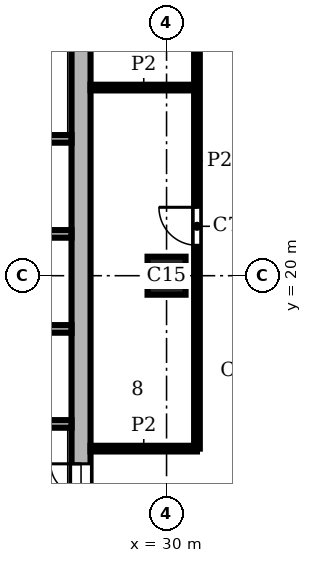
"""IFC4 building model, lengths in metres.
Left out: names, types, materials, properties, quantities, classifications, styles, units other than length and angle.
Written with IfcOpenShell. Run it as: python <this file> out.ifc"""

import sys

from ifc_helpers import new_model, si_unit, direction, frame, frame_2d, origin, origin_2d, place, context, subcontext, project, spatial, rectangle, extrude, element, fill, save


model = new_model("IFC4")
c1 = context("Model", 3, precision=1e-05, world=origin(), true_north=direction((0.0, 1.0)))
c2 = subcontext(c1, "Body", "Model", "MODEL_VIEW")
j1 = project(units=[si_unit("LENGTHUNIT", "METRE"), si_unit("PLANEANGLEUNIT", "RADIAN")], contexts=[c1])
p1 = place(None, origin())
s1 = spatial("IfcSite", under=j1, at=p1, CompositionType="ELEMENT")
p2 = place(p1, origin())
s2 = spatial("IfcBuilding", under=s1, at=p2, CompositionType="ELEMENT")
p3 = place(p2, frame((0.0, 0.0, 309.9)))
s3 = spatial("IfcBuildingStorey", under=s2, at=p3, CompositionType="ELEMENT", Elevation=309.9)
p4 = place(p3, frame((30.0, 20.0, 0.0), z_axis=(0.0, 0.0, 1.0), x_axis=(1.0, 0.0, 0.0)))
e1 = element("IfcColumn", 1, at=p4, inside=s3, PredefinedType="COLUMN", context=c2, shape_type="SweptSolid", body=[
    extrude(rectangle(XDim=1.0, YDim=1.0, at=origin_2d()), origin(), (0.0, 0.0, 1.0), 3.9),
])
p5 = place(p3, frame((27.75, 8.5, 0.0), z_axis=(0.0, 0.0, 1.0), x_axis=(0.0, 1.0, 0.0)))
e2 = element("IfcWall", 2, at=p5, inside=s3, PredefinedType="SHEAR", context=c2, shape_type="SweptSolid", body=[
    extrude(rectangle(XDim=19.0, YDim=0.5, at=frame_2d((9.5, 0.0))), origin(), (0.0, 0.0, 1.0), 3.9),
])
p6 = place(p5, frame((4.95, 0.0, 0.0)))
e3 = element("IfcOpeningElement", 3, at=p6, cuts=e2, PredefinedType="OPENING", context=c2, shape_type="SweptSolid", body=[
    extrude(rectangle(XDim=1.6, YDim=2.1, at=frame_2d((0.8, 1.05))), frame((0.0, 0.26, 0.0), z_axis=(0.0, -1.0, 0.0), x_axis=(1.0, 0.0, 0.0)), (0.0, 0.0, 1.0), 0.52),
])
for number, where, z_axis, x_axis in (
    (4, (24.3, 16.1, 0.0), (0.0, 0.0, 1.0), (1.0, 0.0, 0.0)),
    (5, (24.3, 18.6, 0.0), (0.0, 0.0, 1.0), (1.0, 0.0, 0.0)),
    (6, (24.3, 21.1, 0.0), (0.0, 0.0, 1.0), (1.0, 0.0, 0.0)),
):
    element("IfcWall", number, at=place(p3, frame(where, z_axis=z_axis, x_axis=x_axis)), inside=s3, PredefinedType="SHEAR", context=c2, shape_type="SweptSolid", body=[
        extrude(rectangle(XDim=3.2, YDim=0.2, at=frame_2d((1.6, 0.0))), origin(), (0.0, 0.0, 1.0), 3.58),
    ])
p7 = place(p3, frame((13.8, 23.6, 0.0), z_axis=(0.0, 0.0, 1.0), x_axis=(1.0, 0.0, 0.0)))
e7 = element("IfcWall", 7, at=p7, inside=s3, PredefinedType="SHEAR", context=c2, shape_type="SweptSolid", body=[
    extrude(rectangle(XDim=13.7, YDim=0.2, at=frame_2d((6.85, 0.0))), origin(), (0.0, 0.0, 1.0), 3.58),
])
p8 = place(p7, frame((2.4, 0.0, 0.0)))
e8 = element("IfcOpeningElement", 8, at=p8, cuts=e7, PredefinedType="OPENING", context=c2, shape_type="SweptSolid", body=[
    extrude(rectangle(XDim=1.1, YDim=2.1, at=frame_2d((0.55, 1.05))), frame((0.0, 0.11, 0.0), z_axis=(0.0, -1.0, 0.0), x_axis=(1.0, 0.0, 0.0)), (0.0, 0.0, 1.0), 0.22),
])
p9 = place(p7, frame((4.9, 0.0, 0.0)))
e9 = element("IfcOpeningElement", 9, at=p9, cuts=e7, PredefinedType="OPENING", context=c2, shape_type="SweptSolid", body=[
    extrude(rectangle(XDim=1.1, YDim=2.1, at=frame_2d((0.55, 1.05))), frame((0.0, 0.11, 0.0), z_axis=(0.0, -1.0, 0.0), x_axis=(1.0, 0.0, 0.0)), (0.0, 0.0, 1.0), 0.22),
])
p10 = place(p7, frame((0.15, 0.0, 0.0)))
e10 = element("IfcOpeningElement", 10, at=p10, cuts=e7, PredefinedType="OPENING", context=c2, shape_type="SweptSolid", body=[
    extrude(rectangle(XDim=1.0, YDim=2.1, at=frame_2d((0.5, 1.05))), frame((0.0, 0.11, 0.0), z_axis=(0.0, -1.0, 0.0), x_axis=(1.0, 0.0, 0.0)), (0.0, 0.0, 1.0), 0.22),
])
p11 = place(p3, frame((30.8, 15.45, 0.0), z_axis=(0.0, 0.0, 1.0), x_axis=(0.0, 1.0, 0.0)))
e11 = element("IfcWall", 11, at=p11, inside=s3, PredefinedType="PARTITIONING", context=c2, shape_type="SweptSolid", body=[
    extrude(rectangle(XDim=15.15, YDim=0.15, at=frame_2d((7.575, 0.0))), origin(), (0.0, 0.0, 1.0), 3.58),
])
p12 = place(p11, frame((5.35, 0.0, 0.0)))
e12 = element("IfcOpeningElement", 12, at=p12, cuts=e11, PredefinedType="OPENING", context=c2, shape_type="SweptSolid", body=[
    extrude(rectangle(XDim=1.0, YDim=2.1, at=frame_2d((0.5, 1.05))), frame((0.0, 0.085, 0.0), z_axis=(0.0, -1.0, 0.0), x_axis=(1.0, 0.0, 0.0)), (0.0, 0.0, 1.0), 0.17),
])
for number, where, z_axis, x_axis in (
    (13, (28.0, 15.45, 0.0), (0.0, 0.0, 1.0), (1.0, 0.0, 0.0)),
    (14, (28.0, 24.95, 0.0), (0.0, 0.0, 1.0), (1.0, 0.0, 0.0)),
):
    element("IfcWall", number, at=place(p3, frame(where, z_axis=z_axis, x_axis=x_axis)), inside=s3, PredefinedType="PARTITIONING", context=c2, shape_type="SweptSolid", body=[
        extrude(rectangle(XDim=2.8, YDim=0.15, at=frame_2d((1.4, 0.0))), origin(), (0.0, 0.0, 1.0), 3.58),
    ])
p13 = place(p6, origin())
e15 = element("IfcDoor", 15, at=p13, inside=s3, OperationType="DOUBLE_DOOR_SINGLE_SWING", PredefinedType="DOOR", context=c2, shape_type="SweptSolid", body=[
    extrude(rectangle(XDim=1.6, YDim=2.1, at=frame_2d((0.8, 1.05))), frame((0.0, 0.025, 0.0), z_axis=(0.0, -1.0, 0.0), x_axis=(1.0, 0.0, 0.0)), (0.0, 0.0, 1.0), 0.05),
])
fill(e3, e15)
p14 = place(p12, origin())
e16 = element("IfcDoor", 16, at=p14, inside=s3, OperationType="SINGLE_SWING_RIGHT", PredefinedType="DOOR", context=c2, shape_type="SweptSolid", body=[
    extrude(rectangle(XDim=1.0, YDim=2.1, at=frame_2d((0.5, 1.05))), frame((0.0, 0.025, 0.0), z_axis=(0.0, -1.0, 0.0), x_axis=(1.0, 0.0, 0.0)), (0.0, 0.0, 1.0), 0.05),
])
fill(e12, e16)
save(model, sys.argv[1])
